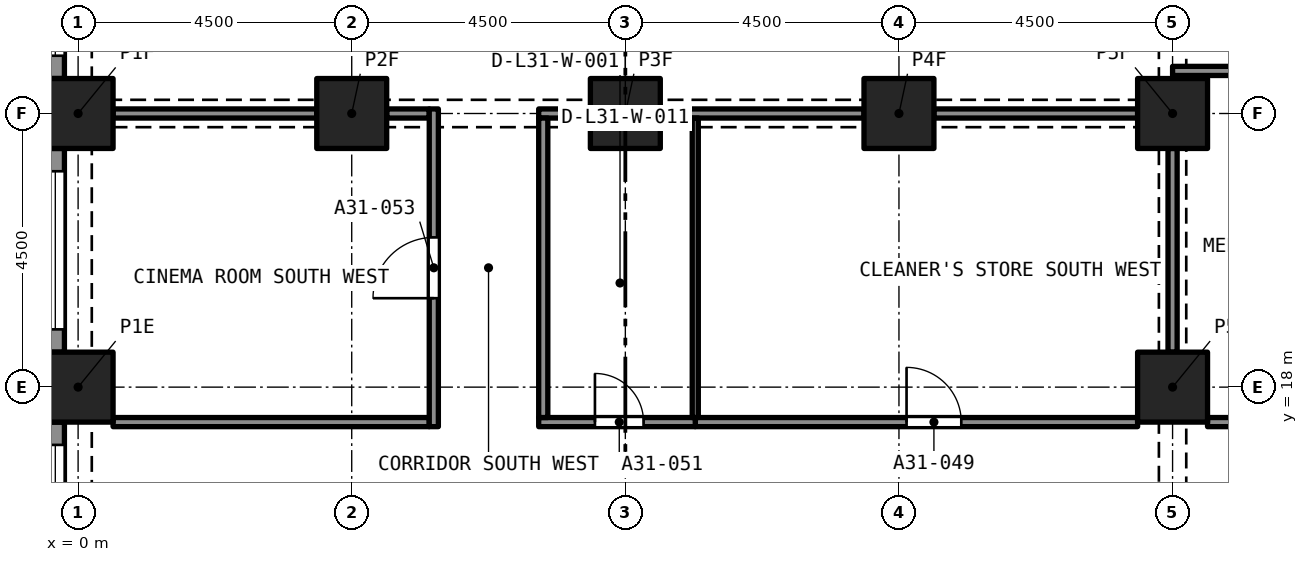
"""IFC4 building model, lengths in metres.
Left out: names, types, materials, properties, quantities, classifications, styles, units other than length and angle.
Written with IfcOpenShell. Run it as: python <this file> out.ifc"""

import sys

from ifc_helpers import new_model, si_unit, direction, frame, frame_2d, origin, origin_2d, place, context, subcontext, project, spatial, rectangle, extrude, element, fill, save


model = new_model("IFC4")
c1 = context("Model", 3, precision=1e-05, world=origin(), true_north=direction((0.0, 1.0)))
c2 = subcontext(c1, "Body", "Model", "MODEL_VIEW")
j1 = project(units=[si_unit("LENGTHUNIT", "METRE"), si_unit("PLANEANGLEUNIT", "RADIAN")], contexts=[c1])
p1 = place(None, origin())
s1 = spatial("IfcSite", under=j1, at=p1, CompositionType="ELEMENT")
p2 = place(p1, origin())
s2 = spatial("IfcBuilding", under=s1, at=p2, CompositionType="ELEMENT")
p3 = place(p2, frame((0.0, 0.0, 112.0)))
s3 = spatial("IfcBuildingStorey", under=s2, at=p3, CompositionType="ELEMENT", Elevation=112.0)
for number, where, z_axis, x_axis in (
    (1, (0.0, 18.0, 0.0), (0.0, 0.0, 1.0), (1.0, 0.0, 0.0)),
    (2, (18.0, 18.0, 0.0), (0.0, 0.0, 1.0), (1.0, 0.0, 0.0)),
    (3, (0.0, 22.5, 0.0), (0.0, 0.0, 1.0), (1.0, 0.0, 0.0)),
    (4, (4.5, 22.5, 0.0), (0.0, 0.0, 1.0), (1.0, 0.0, 0.0)),
    (5, (9.0, 22.5, 0.0), (0.0, 0.0, 1.0), (1.0, 0.0, 0.0)),
    (6, (13.5, 22.5, 0.0), (0.0, 0.0, 1.0), (1.0, 0.0, 0.0)),
    (7, (18.0, 22.5, 0.0), (0.0, 0.0, 1.0), (1.0, 0.0, 0.0)),
):
    element("IfcColumn", number, at=place(p3, frame(where, z_axis=z_axis, x_axis=x_axis)), inside=s3, PredefinedType="COLUMN", context=c2, shape_type="SweptSolid", body=[
        extrude(rectangle(XDim=1.15, YDim=1.15, at=origin_2d()), origin(), (0.0, 0.0, 1.0), 3.2),
    ])
p4 = place(p3, frame((-0.375, 23.075, 0.0), z_axis=(0.0, 0.0, 1.0), x_axis=(0.0, 1.0, 0.0)))
e8 = element("IfcWall", 8, at=p4, inside=s3, PredefinedType="SOLIDWALL", context=c2, shape_type="SweptSolid", body=[
    extrude(rectangle(XDim=3.35, YDim=0.3, at=frame_2d((1.675, 0.0))), origin(), (0.0, 0.0, 1.0), 3.2),
])
p5 = place(p4, frame((0.375, 0.0, 0.45)))
e9 = element("IfcOpeningElement", 9, at=p5, cuts=e8, PredefinedType="OPENING", context=c2, shape_type="SweptSolid", body=[
    extrude(rectangle(XDim=2.6, YDim=1.95, at=frame_2d((1.3, 0.975))), frame((0.0, 0.16, 0.0), z_axis=(0.0, -1.0, 0.0), x_axis=(1.0, 0.0, 0.0)), (0.0, 0.0, 1.0), 0.32),
])
p6 = place(p3, frame((-0.375, 18.575, 0.0), z_axis=(0.0, 0.0, 1.0), x_axis=(0.0, 1.0, 0.0)))
e10 = element("IfcWall", 10, at=p6, inside=s3, PredefinedType="SOLIDWALL", context=c2, shape_type="SweptSolid", body=[
    extrude(rectangle(XDim=3.35, YDim=0.3, at=frame_2d((1.675, 0.0))), origin(), (0.0, 0.0, 1.0), 3.2),
])
p7 = place(p6, frame((0.375, 0.0, 0.45)))
e11 = element("IfcOpeningElement", 11, at=p7, cuts=e10, PredefinedType="OPENING", context=c2, shape_type="SweptSolid", body=[
    extrude(rectangle(XDim=2.6, YDim=1.95, at=frame_2d((1.3, 0.975))), frame((0.0, 0.16, 0.0), z_axis=(0.0, -1.0, 0.0), x_axis=(1.0, 0.0, 0.0)), (0.0, 0.0, 1.0), 0.32),
])
p8 = place(p3, frame((-0.375, 14.075, 0.0), z_axis=(0.0, 0.0, 1.0), x_axis=(0.0, 1.0, 0.0)))
e12 = element("IfcWall", 12, at=p8, inside=s3, PredefinedType="SOLIDWALL", context=c2, shape_type="SweptSolid", body=[
    extrude(rectangle(XDim=3.35, YDim=0.3, at=frame_2d((1.675, 0.0))), origin(), (0.0, 0.0, 1.0), 3.2),
])
p9 = place(p8, frame((0.375, 0.0, 0.45)))
e13 = element("IfcOpeningElement", 13, at=p9, cuts=e12, PredefinedType="OPENING", context=c2, shape_type="SweptSolid", body=[
    extrude(rectangle(XDim=2.6, YDim=1.95, at=frame_2d((1.3, 0.975))), frame((0.0, 0.16, 0.0), z_axis=(0.0, -1.0, 0.0), x_axis=(1.0, 0.0, 0.0)), (0.0, 0.0, 1.0), 0.32),
])
p10 = place(p3, frame((18.575, 17.425, 0.0), z_axis=(0.0, 0.0, 1.0), x_axis=(1.0, 0.0, 0.0)))
e14 = element("IfcWall", 14, at=p10, inside=s3, PredefinedType="PARTITIONING", context=c2, shape_type="SweptSolid", body=[
    extrude(rectangle(XDim=5.2, YDim=0.15, at=frame_2d((2.6, 0.0))), origin(), (0.0, 0.0, 1.0), 2.75),
])
p11 = place(p3, frame((10.15, 17.425, 0.0), z_axis=(0.0, 0.0, 1.0), x_axis=(1.0, 0.0, 0.0)))
e15 = element("IfcWall", 15, at=p11, inside=s3, PredefinedType="PARTITIONING", context=c2, shape_type="SweptSolid", body=[
    extrude(rectangle(XDim=7.275, YDim=0.15, at=frame_2d((3.638, 0.0))), origin(), (0.0, 0.0, 1.0), 2.9),
])
p12 = place(p11, frame((3.475, 0.0, 0.0)))
e16 = element("IfcOpeningElement", 16, at=p12, cuts=e15, PredefinedType="OPENING", context=c2, shape_type="SweptSolid", body=[
    extrude(rectangle(XDim=0.9, YDim=2.1, at=frame_2d((0.45, 1.05))), frame((0.0, 0.085, 0.0), z_axis=(0.0, -1.0, 0.0), x_axis=(1.0, 0.0, 0.0)), (0.0, 0.0, 1.0), 0.17),
])
p13 = place(p3, frame((7.575, 17.425, 0.0), z_axis=(0.0, 0.0, 1.0), x_axis=(1.0, 0.0, 0.0)))
e17 = element("IfcWall", 17, at=p13, inside=s3, PredefinedType="PARTITIONING", context=c2, shape_type="SweptSolid", body=[
    extrude(rectangle(XDim=2.575, YDim=0.15, at=frame_2d((1.288, 0.0))), origin(), (0.0, 0.0, 1.0), 2.9),
])
p14 = place(p13, frame((0.925, 0.0, 0.0)))
e18 = element("IfcOpeningElement", 18, at=p14, cuts=e17, PredefinedType="OPENING", context=c2, shape_type="SweptSolid", body=[
    extrude(rectangle(XDim=0.8, YDim=2.1, at=frame_2d((0.4, 1.05))), frame((0.0, 0.085, 0.0), z_axis=(0.0, -1.0, 0.0), x_axis=(1.0, 0.0, 0.0)), (0.0, 0.0, 1.0), 0.17),
])
p15 = place(p3, frame((0.575, 17.425, 0.0), z_axis=(0.0, 0.0, 1.0), x_axis=(1.0, 0.0, 0.0)))
e19 = element("IfcWall", 19, at=p15, inside=s3, PredefinedType="PARTITIONING", context=c2, shape_type="SweptSolid", body=[
    extrude(rectangle(XDim=5.2, YDim=0.15, at=frame_2d((2.6, 0.0))), origin(), (0.0, 0.0, 1.0), 2.9),
])
p16 = place(p3, frame((18.0, 23.2, 0.0), z_axis=(0.0, 0.0, 1.0), x_axis=(1.0, 0.0, 0.0)))
e20 = element("IfcWall", 20, at=p16, inside=s3, PredefinedType="PARTITIONING", context=c2, shape_type="SweptSolid", body=[
    extrude(rectangle(XDim=5.775, YDim=0.15, at=frame_2d((2.887, 0.0))), origin(), (0.0, 0.0, 1.0), 2.75),
])
for number, where, z_axis, x_axis in (
    (21, (18.0, 18.575, 0.0), (0.0, 0.0, 1.0), (0.0, 1.0, 0.0)),
    (22, (14.075, 22.5, 0.0), (0.0, 0.0, 1.0), (1.0, 0.0, 0.0)),
    (23, (9.575, 22.5, 0.0), (0.0, 0.0, 1.0), (1.0, 0.0, 0.0)),
):
    element("IfcWall", number, at=place(p3, frame(where, z_axis=z_axis, x_axis=x_axis)), inside=s3, PredefinedType="PARTITIONING", context=c2, shape_type="SweptSolid", body=[
        extrude(rectangle(XDim=3.35, YDim=0.15, at=frame_2d((1.675, 0.0))), origin(), (0.0, 0.0, 1.0), 2.38),
    ])
p17 = place(p3, frame((7.575, 22.5, 0.0), z_axis=(0.0, 0.0, 1.0), x_axis=(1.0, 0.0, 0.0)))
e24 = element("IfcWall", 24, at=p17, inside=s3, PredefinedType="PARTITIONING", context=c2, shape_type="SweptSolid", body=[
    extrude(rectangle(XDim=0.85, YDim=0.15, at=frame_2d((0.425, 0.0))), origin(), (0.0, 0.0, 1.0), 2.38),
])
p18 = place(p3, frame((5.075, 22.5, 0.0), z_axis=(0.0, 0.0, 1.0), x_axis=(1.0, 0.0, 0.0)))
e25 = element("IfcWall", 25, at=p18, inside=s3, PredefinedType="PARTITIONING", context=c2, shape_type="SweptSolid", body=[
    extrude(rectangle(XDim=0.7, YDim=0.15, at=frame_2d((0.35, 0.0))), origin(), (0.0, 0.0, 1.0), 2.38),
])
p19 = place(p3, frame((0.575, 22.5, 0.0), z_axis=(0.0, 0.0, 1.0), x_axis=(1.0, 0.0, 0.0)))
e26 = element("IfcWall", 26, at=p19, inside=s3, PredefinedType="PARTITIONING", context=c2, shape_type="SweptSolid", body=[
    extrude(rectangle(XDim=3.35, YDim=0.15, at=frame_2d((1.675, 0.0))), origin(), (0.0, 0.0, 1.0), 2.38),
])
p20 = place(p3, frame((7.65, 17.5, 0.0), z_axis=(0.0, 0.0, 1.0), x_axis=(0.0, 1.0, 0.0)))
e27 = element("IfcWall", 27, at=p20, inside=s3, PredefinedType="PARTITIONING", context=c2, shape_type="SweptSolid", body=[
    extrude(rectangle(XDim=4.925, YDim=0.15, at=frame_2d((2.462, 0.0))), origin(), (0.0, 0.0, 1.0), 2.9),
])
p21 = place(p3, frame((5.85, 17.35, 0.0), z_axis=(0.0, 0.0, 1.0), x_axis=(0.0, 1.0, 0.0)))
e28 = element("IfcWall", 28, at=p21, inside=s3, PredefinedType="PARTITIONING", context=c2, shape_type="SweptSolid", body=[
    extrude(rectangle(XDim=5.225, YDim=0.15, at=frame_2d((2.612, 0.0))), origin(), (0.0, 0.0, 1.0), 2.9),
])
p22 = place(p21, frame((2.113, 0.0, 0.0)))
e29 = element("IfcOpeningElement", 29, at=p22, cuts=e28, PredefinedType="OPENING", context=c2, shape_type="SweptSolid", body=[
    extrude(rectangle(XDim=1.0, YDim=2.1, at=frame_2d((0.5, 1.05))), frame((0.0, 0.085, 0.0), z_axis=(0.0, -1.0, 0.0), x_axis=(1.0, 0.0, 0.0)), (0.0, 0.0, 1.0), 0.17),
])
p23 = place(p3, frame((10.15, 17.5, 0.0), z_axis=(0.0, 0.0, 1.0), x_axis=(0.0, 1.0, 0.0)))
e30 = element("IfcWall", 30, at=p23, inside=s3, PredefinedType="PARTITIONING", context=c2, shape_type="SweptSolid", body=[
    extrude(rectangle(XDim=4.925, YDim=0.1, at=frame_2d((2.462, 0.0))), origin(), (0.0, 0.0, 1.0), 2.9),
])
p24 = place(p5, origin())
e31 = element("IfcWindow", 31, at=p24, inside=s3, PartitioningType="SINGLE_PANEL", PredefinedType="WINDOW", context=c2, shape_type="SweptSolid", body=[
    extrude(rectangle(XDim=2.6, YDim=1.95, at=frame_2d((1.3, 0.975))), frame((0.0, 0.03, 0.0), z_axis=(0.0, -1.0, 0.0), x_axis=(1.0, 0.0, 0.0)), (0.0, 0.0, 1.0), 0.06),
])
fill(e9, e31)
p25 = place(p7, origin())
e32 = element("IfcWindow", 32, at=p25, inside=s3, PartitioningType="SINGLE_PANEL", PredefinedType="WINDOW", context=c2, shape_type="SweptSolid", body=[
    extrude(rectangle(XDim=2.6, YDim=1.95, at=frame_2d((1.3, 0.975))), frame((0.0, 0.03, 0.0), z_axis=(0.0, -1.0, 0.0), x_axis=(1.0, 0.0, 0.0)), (0.0, 0.0, 1.0), 0.06),
])
fill(e11, e32)
p26 = place(p9, origin())
e33 = element("IfcWindow", 33, at=p26, inside=s3, PartitioningType="SINGLE_PANEL", PredefinedType="WINDOW", context=c2, shape_type="SweptSolid", body=[
    extrude(rectangle(XDim=2.6, YDim=1.95, at=frame_2d((1.3, 0.975))), frame((0.0, 0.03, 0.0), z_axis=(0.0, -1.0, 0.0), x_axis=(1.0, 0.0, 0.0)), (0.0, 0.0, 1.0), 0.06),
])
fill(e13, e33)
p27 = place(p12, origin())
e34 = element("IfcDoor", 34, at=p27, inside=s3, OperationType="SINGLE_SWING_RIGHT", PredefinedType="DOOR", context=c2, shape_type="SweptSolid", body=[
    extrude(rectangle(XDim=0.9, YDim=2.1, at=frame_2d((0.45, 1.05))), frame((0.0, 0.025, 0.0), z_axis=(0.0, -1.0, 0.0), x_axis=(1.0, 0.0, 0.0)), (0.0, 0.0, 1.0), 0.05),
])
fill(e16, e34)
p28 = place(p14, origin())
e35 = element("IfcDoor", 35, at=p28, inside=s3, OperationType="SINGLE_SWING_RIGHT", PredefinedType="DOOR", context=c2, shape_type="SweptSolid", body=[
    extrude(rectangle(XDim=0.8, YDim=2.1, at=frame_2d((0.4, 1.05))), frame((0.0, 0.025, 0.0), z_axis=(0.0, -1.0, 0.0), x_axis=(1.0, 0.0, 0.0)), (0.0, 0.0, 1.0), 0.05),
])
fill(e18, e35)
p29 = place(p22, origin())
e36 = element("IfcDoor", 36, at=p29, inside=s3, OperationType="SINGLE_SWING_LEFT", PredefinedType="DOOR", context=c2, shape_type="SweptSolid", body=[
    extrude(rectangle(XDim=1.0, YDim=2.1, at=frame_2d((0.5, 1.05))), frame((0.0, 0.025, 0.0), z_axis=(0.0, -1.0, 0.0), x_axis=(1.0, 0.0, 0.0)), (0.0, 0.0, 1.0), 0.05),
])
fill(e29, e36)
save(model, sys.argv[1])
